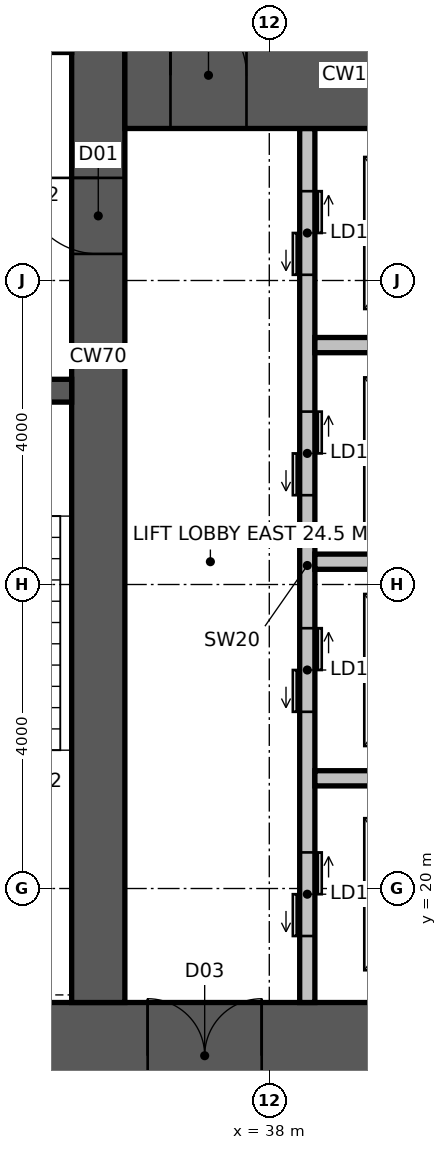
"""IFC4 building model, lengths in metres.
Left out: names, types, materials, properties, quantities, classifications, styles, units other than length and angle.
Written with IfcOpenShell. Run it as: python <this file> out.ifc"""

import sys

from ifc_helpers import new_model, si_unit, direction, frame, frame_2d, origin, place, context, subcontext, project, spatial, rectangle, extrude, element, fill, save


model = new_model("IFC4")
c1 = context("Model", 3, precision=1e-05, world=origin(), true_north=direction((0.0, 1.0)))
c2 = subcontext(c1, "Body", "Model", "MODEL_VIEW")
j1 = project(units=[si_unit("LENGTHUNIT", "METRE"), si_unit("PLANEANGLEUNIT", "RADIAN")], contexts=[c1])
p1 = place(None, origin())
s1 = spatial("IfcSite", under=j1, at=p1, CompositionType="ELEMENT")
p2 = place(p1, origin())
s2 = spatial("IfcBuilding", under=s1, at=p2, CompositionType="ELEMENT")
p3 = place(p2, frame((0.0, 0.0, 63.0)))
s3 = spatial("IfcBuildingStorey", under=s2, at=p3, CompositionType="ELEMENT", Elevation=63.0)
p4 = place(p3, frame((18.5, 17.8, -0.15), z_axis=(0.0, 0.0, 1.0), x_axis=(1.0, 0.0, 0.0)))
e1 = element("IfcWall", 1, at=p4, inside=s3, PredefinedType="SHEAR", context=c2, shape_type="SweptSolid", body=[
    extrude(rectangle(XDim=23.7, YDim=1.4, at=frame_2d((11.85, 0.0))), origin(), (0.0, 0.0, 1.0), 4.0),
])
p5 = place(p4, frame((3.45, 0.0, 0.15)))
e2 = element("IfcOpeningElement", 2, at=p5, cuts=e1, PredefinedType="OPENING", context=c2, shape_type="SweptSolid", body=[
    extrude(rectangle(XDim=1.5, YDim=2.4, at=frame_2d((0.75, 1.2))), frame((0.0, 0.71, 0.0), z_axis=(0.0, -1.0, 0.0), x_axis=(1.0, 0.0, 0.0)), (0.0, 0.0, 1.0), 1.42),
])
p6 = place(p4, frame((17.9, 0.0, 0.15)))
e3 = element("IfcOpeningElement", 3, at=p6, cuts=e1, PredefinedType="OPENING", context=c2, shape_type="SweptSolid", body=[
    extrude(rectangle(XDim=1.5, YDim=2.4, at=frame_2d((0.75, 1.2))), frame((0.0, 0.71, 0.0), z_axis=(0.0, -1.0, 0.0), x_axis=(1.0, 0.0, 0.0)), (0.0, 0.0, 1.0), 1.42),
])
p7 = place(p4, frame((0.9, 0.0, 0.15)))
e4 = element("IfcOpeningElement", 4, at=p7, cuts=e1, PredefinedType="OPENING", context=c2, shape_type="SweptSolid", body=[
    extrude(rectangle(XDim=1.0, YDim=2.2, at=frame_2d((0.5, 1.1))), frame((0.0, 0.71, 0.0), z_axis=(0.0, -1.0, 0.0), x_axis=(1.0, 0.0, 0.0)), (0.0, 0.0, 1.0), 1.42),
])
p8 = place(p3, frame((35.75, 18.5, -0.15), z_axis=(0.0, 0.0, 1.0), x_axis=(0.0, 1.0, 0.0)))
e5 = element("IfcWall", 5, at=p8, inside=s3, PredefinedType="SHEAR", context=c2, shape_type="SweptSolid", body=[
    extrude(rectangle(XDim=17.0, YDim=0.7, at=frame_2d((8.5, 0.0))), origin(), (0.0, 0.0, 1.0), 4.0),
])
p9 = place(p8, frame((9.85, 0.0, 0.15)))
e6 = element("IfcOpeningElement", 6, at=p9, cuts=e5, PredefinedType="OPENING", context=c2, shape_type="SweptSolid", body=[
    extrude(rectangle(XDim=1.0, YDim=2.2, at=frame_2d((0.5, 1.1))), frame((0.0, 0.36, 0.0), z_axis=(0.0, -1.0, 0.0), x_axis=(1.0, 0.0, 0.0)), (0.0, 0.0, 1.0), 0.72),
])
p10 = place(p3, frame((24.15, 26.55, -0.15), z_axis=(0.0, 0.0, 1.0), x_axis=(1.0, 0.0, 0.0)))
e7 = element("IfcWall", 7, at=p10, inside=s3, PredefinedType="SHEAR", context=c2, shape_type="SweptSolid", body=[
    extrude(rectangle(XDim=11.25, YDim=0.3, at=frame_2d((5.625, 0.0))), origin(), (0.0, 0.0, 1.0), 4.0),
])
p11 = place(p10, frame((9.25, 0.0, 0.15)))
e8 = element("IfcOpeningElement", 8, at=p11, cuts=e7, PredefinedType="OPENING", context=c2, shape_type="SweptSolid", body=[
    extrude(rectangle(XDim=1.0, YDim=2.2, at=frame_2d((0.5, 1.1))), frame((0.0, 0.16, 0.0), z_axis=(0.0, -1.0, 0.0), x_axis=(1.0, 0.0, 0.0)), (0.0, 0.0, 1.0), 0.32),
])
p12 = place(p10, frame((4.9, 0.0, 0.15)))
e9 = element("IfcOpeningElement", 9, at=p12, cuts=e7, PredefinedType="OPENING", context=c2, shape_type="SweptSolid", body=[
    extrude(rectangle(XDim=1.5, YDim=2.4, at=frame_2d((0.75, 1.2))), frame((0.0, 0.16, 0.0), z_axis=(0.0, -1.0, 0.0), x_axis=(1.0, 0.0, 0.0)), (0.0, 0.0, 1.0), 0.32),
])
p13 = place(p3, frame((24.15, 31.15, -0.15), z_axis=(0.0, 0.0, 1.0), x_axis=(1.0, 0.0, 0.0)))
e10 = element("IfcWall", 10, at=p13, inside=s3, PredefinedType="SHEAR", context=c2, shape_type="SweptSolid", body=[
    extrude(rectangle(XDim=11.25, YDim=0.3, at=frame_2d((5.625, 0.0))), origin(), (0.0, 0.0, 1.0), 4.0),
])
p14 = place(p13, frame((7.25, 0.0, 0.15)))
e11 = element("IfcOpeningElement", 11, at=p14, cuts=e10, PredefinedType="OPENING", context=c2, shape_type="SweptSolid", body=[
    extrude(rectangle(XDim=1.4, YDim=2.4, at=frame_2d((0.7, 1.2))), frame((0.0, 0.16, 0.0), z_axis=(0.0, -1.0, 0.0), x_axis=(1.0, 0.0, 0.0)), (0.0, 0.0, 1.0), 0.32),
])
p15 = place(p3, frame((38.5, 18.5, -0.15), z_axis=(0.0, 0.0, 1.0), x_axis=(0.0, 1.0, 0.0)))
e12 = element("IfcWall", 12, at=p15, inside=s3, PredefinedType="SOLIDWALL", context=c2, shape_type="SweptSolid", body=[
    extrude(rectangle(XDim=11.5, YDim=0.2, at=frame_2d((5.75, 0.0))), origin(), (0.0, 0.0, 1.0), 4.0),
])
p16 = place(p15, frame((0.875, 0.0, 0.15)))
e13 = element("IfcOpeningElement", 13, at=p16, cuts=e12, PredefinedType="OPENING", context=c2, shape_type="SweptSolid", body=[
    extrude(rectangle(XDim=1.1, YDim=2.2, at=frame_2d((0.55, 1.1))), frame((0.0, 0.11, 0.0), z_axis=(0.0, -1.0, 0.0), x_axis=(1.0, 0.0, 0.0)), (0.0, 0.0, 1.0), 0.22),
])
p17 = place(p15, frame((3.825, 0.0, 0.15)))
e14 = element("IfcOpeningElement", 14, at=p17, cuts=e12, PredefinedType="OPENING", context=c2, shape_type="SweptSolid", body=[
    extrude(rectangle(XDim=1.1, YDim=2.2, at=frame_2d((0.55, 1.1))), frame((0.0, 0.11, 0.0), z_axis=(0.0, -1.0, 0.0), x_axis=(1.0, 0.0, 0.0)), (0.0, 0.0, 1.0), 0.22),
])
p18 = place(p15, frame((6.675, 0.0, 0.15)))
e15 = element("IfcOpeningElement", 15, at=p18, cuts=e12, PredefinedType="OPENING", context=c2, shape_type="SweptSolid", body=[
    extrude(rectangle(XDim=1.1, YDim=2.2, at=frame_2d((0.55, 1.1))), frame((0.0, 0.11, 0.0), z_axis=(0.0, -1.0, 0.0), x_axis=(1.0, 0.0, 0.0)), (0.0, 0.0, 1.0), 0.22),
])
p19 = place(p15, frame((9.575, 0.0, 0.15)))
e16 = element("IfcOpeningElement", 16, at=p19, cuts=e12, PredefinedType="OPENING", context=c2, shape_type="SweptSolid", body=[
    extrude(rectangle(XDim=1.1, YDim=2.2, at=frame_2d((0.55, 1.1))), frame((0.0, 0.11, 0.0), z_axis=(0.0, -1.0, 0.0), x_axis=(1.0, 0.0, 0.0)), (0.0, 0.0, 1.0), 0.22),
])
p20 = place(p3, frame((36.1, 30.7, -0.15), z_axis=(0.0, 0.0, 1.0), x_axis=(1.0, 0.0, 0.0)))
e17 = element("IfcWall", 17, at=p20, inside=s3, PredefinedType="SHEAR", context=c2, shape_type="SweptSolid", body=[
    extrude(rectangle(XDim=6.1, YDim=1.4, at=frame_2d((3.05, 0.0))), origin(), (0.0, 0.0, 1.0), 4.0),
])
p21 = place(p20, frame((0.6, 0.0, 0.15)))
e18 = element("IfcOpeningElement", 18, at=p21, cuts=e17, PredefinedType="OPENING", context=c2, shape_type="SweptSolid", body=[
    extrude(rectangle(XDim=1.0, YDim=2.2, at=frame_2d((0.5, 1.1))), frame((0.0, 0.71, 0.0), z_axis=(0.0, -1.0, 0.0), x_axis=(1.0, 0.0, 0.0)), (0.0, 0.0, 1.0), 1.42),
])
for number, where, z_axis, x_axis in (
    (19, (38.6, 21.45, -0.15), (0.0, 0.0, 1.0), (1.0, 0.0, 0.0)),
    (20, (38.6, 24.3, -0.15), (0.0, 0.0, 1.0), (1.0, 0.0, 0.0)),
    (21, (38.6, 27.15, -0.15), (0.0, 0.0, 1.0), (1.0, 0.0, 0.0)),
):
    element("IfcWall", number, at=place(p3, frame(where, z_axis=z_axis, x_axis=x_axis)), inside=s3, PredefinedType="SOLIDWALL", context=c2, shape_type="SweptSolid", body=[
        extrude(rectangle(XDim=2.9, YDim=0.2, at=frame_2d((1.45, 0.0))), origin(), (0.0, 0.0, 1.0), 4.0),
    ])
p22 = place(p9, origin())
e22 = element("IfcDoor", 22, at=p22, inside=s3, OperationType="SINGLE_SWING_RIGHT", PredefinedType="DOOR", context=c2, shape_type="SweptSolid", body=[
    extrude(rectangle(XDim=1.0, YDim=2.2, at=frame_2d((0.5, 1.1))), frame((0.0, 0.025, 0.0), z_axis=(0.0, -1.0, 0.0), x_axis=(1.0, 0.0, 0.0)), (0.0, 0.0, 1.0), 0.05),
])
fill(e6, e22)
p23 = place(p6, origin())
e23 = element("IfcDoor", 23, at=p23, inside=s3, OperationType="DOUBLE_DOOR_DOUBLE_SWING", PredefinedType="DOOR", context=c2, shape_type="SweptSolid", body=[
    extrude(rectangle(XDim=1.5, YDim=2.4, at=frame_2d((0.75, 1.2))), frame((0.0, 0.025, 0.0), z_axis=(0.0, -1.0, 0.0), x_axis=(1.0, 0.0, 0.0)), (0.0, 0.0, 1.0), 0.05),
])
fill(e3, e23)
p24 = place(p21, origin())
e24 = element("IfcDoor", 24, at=p24, inside=s3, OperationType="SINGLE_SWING_LEFT", PredefinedType="DOOR", context=c2, shape_type="SweptSolid", body=[
    extrude(rectangle(XDim=1.0, YDim=2.2, at=frame_2d((0.5, 1.1))), frame((0.0, 0.025, 0.0), z_axis=(0.0, -1.0, 0.0), x_axis=(1.0, 0.0, 0.0)), (0.0, 0.0, 1.0), 0.05),
])
fill(e18, e24)
p25 = place(p16, origin())
e25 = element("IfcDoor", 25, at=p25, inside=s3, OperationType="DOUBLE_DOOR_SLIDING", PredefinedType="DOOR", context=c2, shape_type="SweptSolid", body=[
    extrude(rectangle(XDim=1.1, YDim=2.2, at=frame_2d((0.55, 1.1))), frame((0.0, 0.025, 0.0), z_axis=(0.0, -1.0, 0.0), x_axis=(1.0, 0.0, 0.0)), (0.0, 0.0, 1.0), 0.05),
])
fill(e13, e25)
p26 = place(p17, origin())
e26 = element("IfcDoor", 26, at=p26, inside=s3, OperationType="DOUBLE_DOOR_SLIDING", PredefinedType="DOOR", context=c2, shape_type="SweptSolid", body=[
    extrude(rectangle(XDim=1.1, YDim=2.2, at=frame_2d((0.55, 1.1))), frame((0.0, 0.025, 0.0), z_axis=(0.0, -1.0, 0.0), x_axis=(1.0, 0.0, 0.0)), (0.0, 0.0, 1.0), 0.05),
])
fill(e14, e26)
p27 = place(p18, origin())
e27 = element("IfcDoor", 27, at=p27, inside=s3, OperationType="DOUBLE_DOOR_SLIDING", PredefinedType="DOOR", context=c2, shape_type="SweptSolid", body=[
    extrude(rectangle(XDim=1.1, YDim=2.2, at=frame_2d((0.55, 1.1))), frame((0.0, 0.025, 0.0), z_axis=(0.0, -1.0, 0.0), x_axis=(1.0, 0.0, 0.0)), (0.0, 0.0, 1.0), 0.05),
])
fill(e15, e27)
p28 = place(p19, origin())
e28 = element("IfcDoor", 28, at=p28, inside=s3, OperationType="DOUBLE_DOOR_SLIDING", PredefinedType="DOOR", context=c2, shape_type="SweptSolid", body=[
    extrude(rectangle(XDim=1.1, YDim=2.2, at=frame_2d((0.55, 1.1))), frame((0.0, 0.025, 0.0), z_axis=(0.0, -1.0, 0.0), x_axis=(1.0, 0.0, 0.0)), (0.0, 0.0, 1.0), 0.05),
])
fill(e16, e28)
save(model, sys.argv[1])
